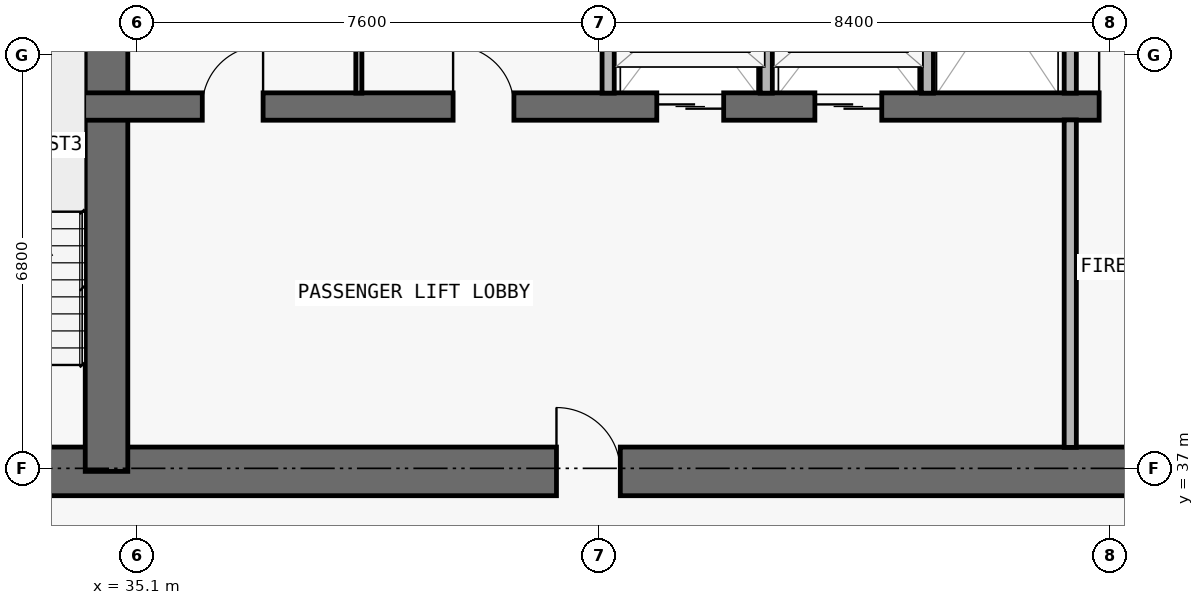
"""IFC4 building model, lengths in metres.
Left out: names, types, materials, properties, quantities, classifications, styles, units other than length and angle.
Written with IfcOpenShell. Run it as: python <this file> out.ifc"""

import sys

from ifc_helpers import new_model, si_unit, direction, frame, frame_2d, origin, place, context, subcontext, project, spatial, rectangle, extrude, element, fill, save


model = new_model("IFC4")
c1 = context("Model", 3, precision=1e-05, world=origin(), true_north=direction((0.0, 1.0)))
c2 = subcontext(c1, "Body", "Model", "MODEL_VIEW")
j1 = project(units=[si_unit("LENGTHUNIT", "METRE"), si_unit("PLANEANGLEUNIT", "RADIAN")], contexts=[c1])
p1 = place(None, origin())
s1 = spatial("IfcSite", under=j1, at=p1, CompositionType="ELEMENT")
p2 = place(p1, origin())
s2 = spatial("IfcBuilding", under=s1, at=p2, CompositionType="ELEMENT")
p3 = place(p2, frame((0.0, 0.0, 119.1)))
s3 = spatial("IfcBuildingStorey", under=s2, at=p3, CompositionType="ELEMENT", Elevation=119.1)
p4 = place(p3, frame((17.85, 36.95, 0.0), z_axis=(0.0, 0.0, 1.0), x_axis=(1.0, 0.0, 0.0)))
e1 = element("IfcWall", 1, at=p4, inside=s3, PredefinedType="SHEAR", context=c2, shape_type="SweptSolid", body=[
    extrude(rectangle(XDim=42.1, YDim=0.8, at=frame_2d((21.05, 0.0))), origin(), (0.0, 0.0, 1.0), 3.05),
])
p5 = place(p4, frame((14.45, 0.0, 0.0)))
e2 = element("IfcOpeningElement", 2, at=p5, cuts=e1, PredefinedType="OPENING", context=c2, shape_type="SweptSolid", body=[
    extrude(rectangle(XDim=1.1, YDim=2.15, at=frame_2d((0.55, 1.075))), frame((0.0, 0.41, 0.0), z_axis=(0.0, -1.0, 0.0), x_axis=(1.0, 0.0, 0.0)), (0.0, 0.0, 1.0), 0.82),
])
p6 = place(p4, frame((6.3, 0.0, 0.0)))
e3 = element("IfcOpeningElement", 3, at=p6, cuts=e1, PredefinedType="OPENING", context=c2, shape_type="SweptSolid", body=[
    extrude(rectangle(XDim=1.05, YDim=2.15, at=frame_2d((0.525, 1.075))), frame((0.0, 0.41, 0.0), z_axis=(0.0, -1.0, 0.0), x_axis=(1.0, 0.0, 0.0)), (0.0, 0.0, 1.0), 0.82),
])
p7 = place(p4, frame((34.8, 0.0, 0.0)))
e4 = element("IfcOpeningElement", 4, at=p7, cuts=e1, PredefinedType="OPENING", context=c2, shape_type="SweptSolid", body=[
    extrude(rectangle(XDim=1.05, YDim=2.15, at=frame_2d((0.525, 1.075))), frame((0.0, 0.41, 0.0), z_axis=(0.0, -1.0, 0.0), x_axis=(1.0, 0.0, 0.0)), (0.0, 0.0, 1.0), 0.82),
])
p8 = place(p4, frame((10.913, 0.0, 0.0)))
e5 = element("IfcOpeningElement", 5, at=p8, cuts=e1, PredefinedType="OPENING", context=c2, shape_type="SweptSolid", body=[
    extrude(rectangle(XDim=1.05, YDim=2.15, at=frame_2d((0.525, 1.075))), frame((0.0, 0.41, 0.0), z_axis=(0.0, -1.0, 0.0), x_axis=(1.0, 0.0, 0.0)), (0.0, 0.0, 1.0), 0.82),
])
p9 = place(p4, frame((24.15, 0.0, 0.0)))
e6 = element("IfcOpeningElement", 6, at=p9, cuts=e1, PredefinedType="OPENING", context=c2, shape_type="SweptSolid", body=[
    extrude(rectangle(XDim=1.05, YDim=2.15, at=frame_2d((0.525, 1.075))), frame((0.0, 0.41, 0.0), z_axis=(0.0, -1.0, 0.0), x_axis=(1.0, 0.0, 0.0)), (0.0, 0.0, 1.0), 0.82),
])
p10 = place(p3, frame((34.6, 36.95, 0.0), z_axis=(0.0, 0.0, 1.0), x_axis=(0.0, 1.0, 0.0)))
e7 = element("IfcWall", 7, at=p10, inside=s3, PredefinedType="SHEAR", context=c2, shape_type="SweptSolid", body=[
    extrude(rectangle(XDim=9.625, YDim=0.7, at=frame_2d((4.812, 0.0))), origin(), (0.0, 0.0, 1.0), 3.05),
])
p11 = place(p3, frame((22.25, 42.95, 0.0), z_axis=(0.0, 0.0, 1.0), x_axis=(1.0, 0.0, 0.0)))
e8 = element("IfcWall", 8, at=p11, inside=s3, PredefinedType="SHEAR", context=c2, shape_type="SweptSolid", body=[
    extrude(rectangle(XDim=33.3, YDim=0.45, at=frame_2d((16.65, 0.0))), origin(), (0.0, 0.0, 1.0), 3.05),
])
p12 = place(p11, frame((1.05, 0.0, 0.0)))
e9 = element("IfcOpeningElement", 9, at=p12, cuts=e8, PredefinedType="OPENING", context=c2, shape_type="SweptSolid", body=[
    extrude(rectangle(XDim=1.2, YDim=2.2, at=frame_2d((0.6, 1.1))), frame((0.0, 0.235, 0.0), z_axis=(0.0, -1.0, 0.0), x_axis=(1.0, 0.0, 0.0)), (0.0, 0.0, 1.0), 0.47),
])
p13 = place(p11, frame((31.05, 0.0, 0.0)))
e10 = element("IfcOpeningElement", 10, at=p13, cuts=e8, PredefinedType="OPENING", context=c2, shape_type="SweptSolid", body=[
    extrude(rectangle(XDim=1.2, YDim=2.2, at=frame_2d((0.6, 1.1))), frame((0.0, 0.235, 0.0), z_axis=(0.0, -1.0, 0.0), x_axis=(1.0, 0.0, 0.0)), (0.0, 0.0, 1.0), 0.47),
])
p14 = place(p11, frame((21.4, 0.0, 0.0)))
e11 = element("IfcOpeningElement", 11, at=p14, cuts=e8, PredefinedType="OPENING", context=c2, shape_type="SweptSolid", body=[
    extrude(rectangle(XDim=1.1, YDim=2.2, at=frame_2d((0.55, 1.1))), frame((0.0, 0.235, 0.0), z_axis=(0.0, -1.0, 0.0), x_axis=(1.0, 0.0, 0.0)), (0.0, 0.0, 1.0), 0.47),
])
p15 = place(p11, frame((24.0, 0.0, 0.0)))
e12 = element("IfcOpeningElement", 12, at=p15, cuts=e8, PredefinedType="OPENING", context=c2, shape_type="SweptSolid", body=[
    extrude(rectangle(XDim=1.1, YDim=2.2, at=frame_2d((0.55, 1.1))), frame((0.0, 0.235, 0.0), z_axis=(0.0, -1.0, 0.0), x_axis=(1.0, 0.0, 0.0)), (0.0, 0.0, 1.0), 0.47),
])
p16 = place(p11, frame((3.625, 0.0, 0.0)))
e13 = element("IfcOpeningElement", 13, at=p16, cuts=e8, PredefinedType="OPENING", context=c2, shape_type="SweptSolid", body=[
    extrude(rectangle(XDim=1.05, YDim=2.15, at=frame_2d((0.525, 1.075))), frame((0.0, 0.235, 0.0), z_axis=(0.0, -1.0, 0.0), x_axis=(1.0, 0.0, 0.0)), (0.0, 0.0, 1.0), 0.47),
])
p17 = place(p11, frame((28.675, 0.0, 0.0)))
e14 = element("IfcOpeningElement", 14, at=p17, cuts=e8, PredefinedType="OPENING", context=c2, shape_type="SweptSolid", body=[
    extrude(rectangle(XDim=1.05, YDim=2.15, at=frame_2d((0.525, 1.075))), frame((0.0, 0.235, 0.0), z_axis=(0.0, -1.0, 0.0), x_axis=(1.0, 0.0, 0.0)), (0.0, 0.0, 1.0), 0.47),
])
p18 = place(p11, frame((13.925, 0.0, 0.0)))
e15 = element("IfcOpeningElement", 15, at=p18, cuts=e8, PredefinedType="OPENING", context=c2, shape_type="SweptSolid", body=[
    extrude(rectangle(XDim=1.0, YDim=2.2, at=frame_2d((0.5, 1.1))), frame((0.0, 0.235, 0.0), z_axis=(0.0, -1.0, 0.0), x_axis=(1.0, 0.0, 0.0)), (0.0, 0.0, 1.0), 0.47),
])
p19 = place(p11, frame((18.05, 0.0, 0.0)))
e16 = element("IfcOpeningElement", 16, at=p19, cuts=e8, PredefinedType="OPENING", context=c2, shape_type="SweptSolid", body=[
    extrude(rectangle(XDim=1.0, YDim=2.2, at=frame_2d((0.5, 1.1))), frame((0.0, 0.235, 0.0), z_axis=(0.0, -1.0, 0.0), x_axis=(1.0, 0.0, 0.0)), (0.0, 0.0, 1.0), 0.47),
])
p20 = place(p3, frame((38.75, 43.17, 0.0), z_axis=(0.0, 0.0, 1.0), x_axis=(0.0, 1.0, 0.0)))
e17 = element("IfcWall", 17, at=p20, inside=s3, PredefinedType="MOVABLE", context=c2, shape_type="SweptSolid", body=[
    extrude(rectangle(XDim=3.185, YDim=0.1, at=frame_2d((1.593, 0.0))), origin(), (0.0, 0.0, 1.0), 3.05),
])
for number, where, z_axis, x_axis in (
    (18, (42.85, 43.17, 0.0), (0.0, 0.0, 1.0), (0.0, 1.0, 0.0)),
    (19, (45.45, 43.17, 0.0), (0.0, 0.0, 1.0), (0.0, 1.0, 0.0)),
    (20, (48.1, 43.17, 0.0), (0.0, 0.0, 1.0), (0.0, 1.0, 0.0)),
):
    element("IfcWall", number, at=place(p3, frame(where, z_axis=z_axis, x_axis=x_axis)), inside=s3, PredefinedType="PARTITIONING", context=c2, shape_type="SweptSolid", body=[
        extrude(rectangle(XDim=3.185, YDim=0.2, at=frame_2d((1.593, 0.0))), origin(), (0.0, 0.0, 1.0), 3.05),
    ])
p21 = place(p3, frame((50.45, 37.345, 0.0), z_axis=(0.0, 0.0, 1.0), x_axis=(0.0, 1.0, 0.0)))
e21 = element("IfcWall", 21, at=p21, inside=s3, PredefinedType="PARTITIONING", context=c2, shape_type="SweptSolid", body=[
    extrude(rectangle(XDim=5.385, YDim=0.2, at=frame_2d((2.692, 0.0))), origin(), (0.0, 0.0, 1.0), 3.05),
])
p22 = place(p3, frame((50.45, 43.17, 0.0), z_axis=(0.0, 0.0, 1.0), x_axis=(0.0, 1.0, 0.0)))
e22 = element("IfcWall", 22, at=p22, inside=s3, PredefinedType="PARTITIONING", context=c2, shape_type="SweptSolid", body=[
    extrude(rectangle(XDim=3.185, YDim=0.2, at=frame_2d((1.593, 0.0))), origin(), (0.0, 0.0, 1.0), 3.05),
])
p23 = place(p14, origin())
e23 = element("IfcDoor", 23, at=p23, inside=s3, OperationType="DOUBLE_DOOR_SLIDING", PredefinedType="DOOR", context=c2, shape_type="SweptSolid", body=[
    extrude(rectangle(XDim=1.1, YDim=2.2, at=frame_2d((0.55, 1.1))), frame((0.0, 0.025, 0.0), z_axis=(0.0, -1.0, 0.0), x_axis=(1.0, 0.0, 0.0)), (0.0, 0.0, 1.0), 0.05),
])
fill(e11, e23)
p24 = place(p15, origin())
e24 = element("IfcDoor", 24, at=p24, inside=s3, OperationType="DOUBLE_DOOR_SLIDING", PredefinedType="DOOR", context=c2, shape_type="SweptSolid", body=[
    extrude(rectangle(XDim=1.1, YDim=2.2, at=frame_2d((0.55, 1.1))), frame((0.0, 0.025, 0.0), z_axis=(0.0, -1.0, 0.0), x_axis=(1.0, 0.0, 0.0)), (0.0, 0.0, 1.0), 0.05),
])
fill(e12, e24)
p25 = place(p17, origin())
e25 = element("IfcDoor", 25, at=p25, inside=s3, OperationType="SINGLE_SWING_LEFT", PredefinedType="DOOR", context=c2, shape_type="SweptSolid", body=[
    extrude(rectangle(XDim=1.05, YDim=2.15, at=frame_2d((0.525, 1.075))), frame((0.0, 0.025, 0.0), z_axis=(0.0, -1.0, 0.0), x_axis=(1.0, 0.0, 0.0)), (0.0, 0.0, 1.0), 0.05),
])
fill(e14, e25)
p26 = place(p9, origin())
e26 = element("IfcDoor", 26, at=p26, inside=s3, OperationType="SINGLE_SWING_LEFT", PredefinedType="DOOR", context=c2, shape_type="SweptSolid", body=[
    extrude(rectangle(XDim=1.05, YDim=2.15, at=frame_2d((0.525, 1.075))), frame((0.0, 0.025, 0.0), z_axis=(0.0, -1.0, 0.0), x_axis=(1.0, 0.0, 0.0)), (0.0, 0.0, 1.0), 0.05),
])
fill(e6, e26)
p27 = place(p18, origin())
e27 = element("IfcDoor", 27, at=p27, inside=s3, OperationType="SINGLE_SWING_RIGHT", PredefinedType="DOOR", context=c2, shape_type="SweptSolid", body=[
    extrude(rectangle(XDim=1.0, YDim=2.2, at=frame_2d((0.5, 1.1))), frame((0.0, 0.025, 0.0), z_axis=(0.0, -1.0, 0.0), x_axis=(1.0, 0.0, 0.0)), (0.0, 0.0, 1.0), 0.05),
])
fill(e15, e27)
p28 = place(p19, origin())
e28 = element("IfcDoor", 28, at=p28, inside=s3, OperationType="SINGLE_SWING_LEFT", PredefinedType="DOOR", context=c2, shape_type="SweptSolid", body=[
    extrude(rectangle(XDim=1.0, YDim=2.2, at=frame_2d((0.5, 1.1))), frame((0.0, 0.025, 0.0), z_axis=(0.0, -1.0, 0.0), x_axis=(1.0, 0.0, 0.0)), (0.0, 0.0, 1.0), 0.05),
])
fill(e16, e28)
save(model, sys.argv[1])
